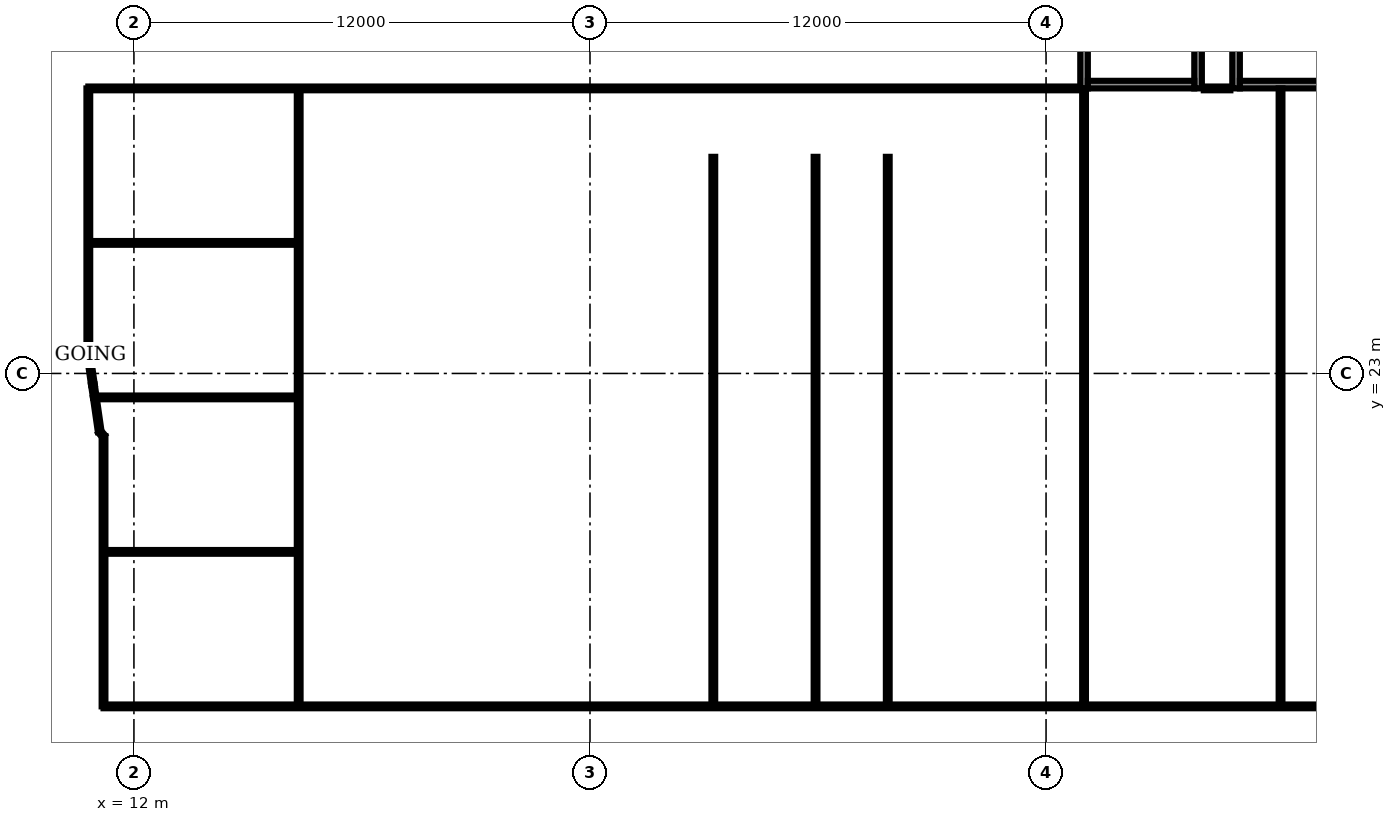
"""IFC4 building model, lengths in metres.
Left out: names, types, materials, properties, quantities, classifications, styles, units other than length and angle.
Written with IfcOpenShell. Run it as: python <this file> out.ifc"""

import sys

from ifc_helpers import new_model, si_unit, direction, frame, frame_2d, origin, origin_2d, place, context, subcontext, project, spatial, rectangle, i_section, extrude, element, fill, save


model = new_model("IFC4")
c1 = context("Model", 3, precision=1e-05, world=origin(), true_north=direction((0.0, 1.0)))
c2 = subcontext(c1, "Body", "Model", "MODEL_VIEW")
j1 = project(units=[si_unit("LENGTHUNIT", "METRE"), si_unit("PLANEANGLEUNIT", "RADIAN")], contexts=[c1])
p1 = place(None, origin())
s1 = spatial("IfcSite", under=j1, at=p1, CompositionType="ELEMENT")
p2 = place(p1, origin())
s2 = spatial("IfcBuilding", under=s1, at=p2, CompositionType="ELEMENT")
p3 = place(p2, frame((0.0, 0.0, 41.5)))
s3 = spatial("IfcBuildingStorey", under=s2, at=p3, CompositionType="ELEMENT", Elevation=41.5)
for number, where, z_axis, x_axis in (
    (1, (12.0, 23.0, 0.0), (0.0, 0.0, 1.0), (1.0, 0.0, 0.0)),
    (2, (24.0, 23.0, 0.0), (0.0, 0.0, 1.0), (1.0, 0.0, 0.0)),
    (3, (36.0, 23.0, 0.0), (0.0, 0.0, 1.0), (1.0, 0.0, 0.0)),
):
    element("IfcColumn", number, at=place(p3, frame(where, z_axis=z_axis, x_axis=x_axis)), inside=s3, PredefinedType="COLUMN", context=c2, shape_type="SweptSolid", body=[
        extrude(i_section(OverallWidth=0.305, OverallDepth=0.62, WebThickness=0.021, FlangeThickness=0.04, FilletRadius=0.027, at=origin_2d()), origin(), (0.0, 0.0, 1.0), 3.6),
    ])
p4 = place(p3, frame((37.0, 30.5, 0.0), z_axis=(0.0, 0.0, 1.0), x_axis=(0.0, 1.0, 0.0)))
e4 = element("IfcWall", 4, at=p4, inside=s3, PredefinedType="PARTITIONING", context=c2, shape_type="SweptSolid", body=[
    extrude(rectangle(XDim=3.5, YDim=0.2, at=frame_2d((1.75, 0.0))), origin(), (0.0, 0.0, 1.0), 3.2),
])
p5 = place(p4, frame((1.2, 0.0, 0.0)))
e5 = element("IfcOpeningElement", 5, at=p5, cuts=e4, PredefinedType="OPENING", context=c2, shape_type="SweptSolid", body=[
    extrude(rectangle(XDim=1.1, YDim=2.1, at=frame_2d((0.55, 1.05))), frame((0.0, 0.11, 0.0), z_axis=(0.0, -1.0, 0.0), x_axis=(1.0, 0.0, 0.0)), (0.0, 0.0, 1.0), 0.22),
])
p6 = place(p3, frame((40.0, 30.5, 0.0), z_axis=(0.0, 0.0, 1.0), x_axis=(0.0, 1.0, 0.0)))
e6 = element("IfcWall", 6, at=p6, inside=s3, PredefinedType="PARTITIONING", context=c2, shape_type="SweptSolid", body=[
    extrude(rectangle(XDim=3.5, YDim=0.2, at=frame_2d((1.75, 0.0))), origin(), (0.0, 0.0, 1.0), 3.2),
])
p7 = place(p3, frame((37.1, 30.6, 0.0), z_axis=(0.0, 0.0, 1.0), x_axis=(1.0, 0.0, 0.0)))
e7 = element("IfcWall", 7, at=p7, inside=s3, PredefinedType="PARTITIONING", context=c2, shape_type="SweptSolid", body=[
    extrude(rectangle(XDim=2.8, YDim=0.2, at=frame_2d((1.4, 0.0))), origin(), (0.0, 0.0, 1.0), 3.2),
])
p8 = place(p3, frame((41.0, 30.5, 0.0), z_axis=(0.0, 0.0, 1.0), x_axis=(0.0, 1.0, 0.0)))
e8 = element("IfcWall", 8, at=p8, inside=s3, PredefinedType="PARTITIONING", context=c2, shape_type="SweptSolid", body=[
    extrude(rectangle(XDim=3.5, YDim=0.2, at=frame_2d((1.75, 0.0))), origin(), (0.0, 0.0, 1.0), 3.2),
])
p9 = place(p3, frame((41.1, 30.6, 0.0), z_axis=(0.0, 0.0, 1.0), x_axis=(1.0, 0.0, 0.0)))
e9 = element("IfcWall", 9, at=p9, inside=s3, PredefinedType="PARTITIONING", context=c2, shape_type="SweptSolid", body=[
    extrude(rectangle(XDim=2.8, YDim=0.2, at=frame_2d((1.4, 0.0))), origin(), (0.0, 0.0, 1.0), 3.2),
])
p10 = place(p3, frame((10.8, 23.55, 0.0), z_axis=(0.0, 0.0, 1.0), x_axis=(0.0, 1.0, 0.0)))
e10 = element("IfcWall", 10, at=p10, inside=s3, PredefinedType="PARTITIONING", context=c2, shape_type="SweptSolid", body=[
    extrude(rectangle(XDim=6.95, YDim=0.1, at=frame_2d((3.475, 0.0))), origin(), (0.0, 0.0, 1.0), 3.2),
])
p11 = place(p10, frame((0.308, 0.0, 0.0)))
e11 = element("IfcOpeningElement", 11, at=p11, cuts=e10, PredefinedType="OPENING", context=c2, shape_type="SweptSolid", body=[
    extrude(rectangle(XDim=1.0, YDim=2.1, at=frame_2d((0.5, 1.05))), frame((0.0, 0.06, 0.0), z_axis=(0.0, -1.0, 0.0), x_axis=(1.0, 0.0, 0.0)), (0.0, 0.0, 1.0), 0.12),
])
p12 = place(p3, frame((10.8, 26.435, 0.0), z_axis=(0.0, 0.0, 1.0), x_axis=(1.0, 0.0, 0.0)))
e12 = element("IfcWall", 12, at=p12, inside=s3, PredefinedType="PARTITIONING", context=c2, shape_type="SweptSolid", body=[
    extrude(rectangle(XDim=5.535, YDim=0.1, at=frame_2d((2.768, 0.0))), origin(), (0.0, 0.0, 1.0), 3.2),
])
p13 = place(p3, frame((10.8, 30.5, 0.0), z_axis=(0.0, 0.0, 1.0), x_axis=(1.0, 0.0, 0.0)))
e13 = element("IfcWall", 13, at=p13, inside=s3, PredefinedType="PARTITIONING", context=c2, shape_type="SweptSolid", body=[
    extrude(rectangle(XDim=26.05, YDim=0.1, at=frame_2d((13.025, 0.0))), origin(), (0.0, 0.0, 1.0), 3.2),
])
p14 = place(p13, frame((0.235, 0.0, 0.0)))
e14 = element("IfcOpeningElement", 14, at=p14, cuts=e13, PredefinedType="OPENING", context=c2, shape_type="SweptSolid", body=[
    extrude(rectangle(XDim=1.0, YDim=2.1, at=frame_2d((0.5, 1.05))), frame((0.0, 0.06, 0.0), z_axis=(0.0, -1.0, 0.0), x_axis=(1.0, 0.0, 0.0)), (0.0, 0.0, 1.0), 0.12),
])
p15 = place(p13, frame((10.955, 0.0, 0.0)))
e15 = element("IfcOpeningElement", 15, at=p15, cuts=e13, PredefinedType="OPENING", context=c2, shape_type="SweptSolid", body=[
    extrude(rectangle(XDim=1.0, YDim=2.1, at=frame_2d((0.5, 1.05))), frame((0.0, 0.06, 0.0), z_axis=(0.0, -1.0, 0.0), x_axis=(1.0, 0.0, 0.0)), (0.0, 0.0, 1.0), 0.12),
])
p16 = place(p3, frame((10.92, 22.705, 0.0), z_axis=(0.0, 0.0, 1.0), x_axis=(-0.14046, 0.990086, 0.0)))
e16 = element("IfcWall", 16, at=p16, inside=s3, PredefinedType="PARTITIONING", context=c2, shape_type="SweptSolid", body=[
    extrude(rectangle(XDim=0.854, YDim=0.1, at=frame_2d((0.427, 0.0))), origin(), (0.0, 0.0, 1.0), 3.2),
])
p17 = place(p3, frame((10.97, 22.37, 0.0), z_axis=(0.0, 0.0, 1.0), x_axis=(-0.147776, 0.989018, 0.0)))
e17 = element("IfcWall", 17, at=p17, inside=s3, PredefinedType="PARTITIONING", context=c2, shape_type="SweptSolid", body=[
    extrude(rectangle(XDim=0.339, YDim=0.1, at=frame_2d((0.169, 0.0))), origin(), (0.0, 0.0, 1.0), 3.2),
])
p18 = place(p3, frame((10.97, 22.37, 0.0), z_axis=(0.0, 0.0, 1.0), x_axis=(1.0, 0.0, 0.0)))
e18 = element("IfcWall", 18, at=p18, inside=s3, PredefinedType="PARTITIONING", context=c2, shape_type="SweptSolid", body=[
    extrude(rectangle(XDim=5.365, YDim=0.1, at=frame_2d((2.683, 0.0))), origin(), (0.0, 0.0, 1.0), 3.2),
])
p19 = place(p3, frame((11.1, 21.465, 0.0), z_axis=(0.0, 0.0, 1.0), x_axis=(-0.142318, 0.989818, 0.0)))
e19 = element("IfcWall", 19, at=p19, inside=s3, PredefinedType="PARTITIONING", context=c2, shape_type="SweptSolid", body=[
    extrude(rectangle(XDim=0.914, YDim=0.1, at=frame_2d((0.457, 0.0))), origin(), (0.0, 0.0, 1.0), 3.2),
])
p20 = place(p3, frame((11.2, 14.24, 0.0), z_axis=(0.0, 0.0, 1.0), x_axis=(0.0, 1.0, 0.0)))
e20 = element("IfcWall", 20, at=p20, inside=s3, PredefinedType="PARTITIONING", context=c2, shape_type="SweptSolid", body=[
    extrude(rectangle(XDim=7.11, YDim=0.1, at=frame_2d((3.555, 0.0))), origin(), (0.0, 0.0, 1.0), 3.2),
])
p21 = place(p20, frame((5.085, 0.0, 0.0)))
e21 = element("IfcOpeningElement", 21, at=p21, cuts=e20, PredefinedType="OPENING", context=c2, shape_type="SweptSolid", body=[
    extrude(rectangle(XDim=1.0, YDim=2.1, at=frame_2d((0.5, 1.05))), frame((0.0, 0.06, 0.0), z_axis=(0.0, -1.0, 0.0), x_axis=(1.0, 0.0, 0.0)), (0.0, 0.0, 1.0), 0.12),
])
p22 = place(p3, frame((11.2, 14.24, 0.0), z_axis=(0.0, 0.0, 1.0), x_axis=(1.0, 0.0, 0.0)))
e22 = element("IfcWall", 22, at=p22, inside=s3, PredefinedType="PARTITIONING", context=c2, shape_type="SweptSolid", body=[
    extrude(rectangle(XDim=51.635, YDim=0.1, at=frame_2d((25.817, 0.0))), origin(), (0.0, 0.0, 1.0), 3.2),
])
p23 = place(p22, frame((0.115, 0.0, 0.0)))
e23 = element("IfcOpeningElement", 23, at=p23, cuts=e22, PredefinedType="OPENING", context=c2, shape_type="SweptSolid", body=[
    extrude(rectangle(XDim=1.0, YDim=2.1, at=frame_2d((0.5, 1.05))), frame((0.0, 0.06, 0.0), z_axis=(0.0, -1.0, 0.0), x_axis=(1.0, 0.0, 0.0)), (0.0, 0.0, 1.0), 0.12),
])
p24 = place(p22, frame((6.635, 0.0, 0.0)))
e24 = element("IfcOpeningElement", 24, at=p24, cuts=e22, PredefinedType="OPENING", context=c2, shape_type="SweptSolid", body=[
    extrude(rectangle(XDim=1.0, YDim=2.1, at=frame_2d((0.5, 1.05))), frame((0.0, 0.06, 0.0), z_axis=(0.0, -1.0, 0.0), x_axis=(1.0, 0.0, 0.0)), (0.0, 0.0, 1.0), 0.12),
])
p25 = place(p22, frame((22.7, 0.0, 0.0)))
e25 = element("IfcOpeningElement", 25, at=p25, cuts=e22, PredefinedType="OPENING", context=c2, shape_type="SweptSolid", body=[
    extrude(rectangle(XDim=1.0, YDim=2.1, at=frame_2d((0.5, 1.05))), frame((0.0, 0.06, 0.0), z_axis=(0.0, -1.0, 0.0), x_axis=(1.0, 0.0, 0.0)), (0.0, 0.0, 1.0), 0.12),
])
p26 = place(p22, frame((27.865, 0.0, 0.0)))
e26 = element("IfcOpeningElement", 26, at=p26, cuts=e22, PredefinedType="OPENING", context=c2, shape_type="SweptSolid", body=[
    extrude(rectangle(XDim=1.0, YDim=2.1, at=frame_2d((0.5, 1.05))), frame((0.0, 0.06, 0.0), z_axis=(0.0, -1.0, 0.0), x_axis=(1.0, 0.0, 0.0)), (0.0, 0.0, 1.0), 0.12),
])
p27 = place(p22, frame((34.065, 0.0, 0.0)))
e27 = element("IfcOpeningElement", 27, at=p27, cuts=e22, PredefinedType="OPENING", context=c2, shape_type="SweptSolid", body=[
    extrude(rectangle(XDim=1.8, YDim=2.1, at=frame_2d((0.9, 1.05))), frame((0.0, 0.06, 0.0), z_axis=(0.0, -1.0, 0.0), x_axis=(1.0, 0.0, 0.0)), (0.0, 0.0, 1.0), 0.12),
])
p28 = place(p22, frame((41.765, 0.0, 0.0)))
e28 = element("IfcOpeningElement", 28, at=p28, cuts=e22, PredefinedType="OPENING", context=c2, shape_type="SweptSolid", body=[
    extrude(rectangle(XDim=1.8, YDim=2.1, at=frame_2d((0.9, 1.05))), frame((0.0, 0.06, 0.0), z_axis=(0.0, -1.0, 0.0), x_axis=(1.0, 0.0, 0.0)), (0.0, 0.0, 1.0), 0.12),
])
p29 = place(p3, frame((11.2, 18.305, 0.0), z_axis=(0.0, 0.0, 1.0), x_axis=(1.0, 0.0, 0.0)))
e29 = element("IfcWall", 29, at=p29, inside=s3, PredefinedType="PARTITIONING", context=c2, shape_type="SweptSolid", body=[
    extrude(rectangle(XDim=5.135, YDim=0.1, at=frame_2d((2.567, 0.0))), origin(), (0.0, 0.0, 1.0), 3.2),
])
p30 = place(p3, frame((11.2, 21.35, 0.0), z_axis=(0.0, 0.0, 1.0), x_axis=(-0.65566, 0.755051, 0.0)))
e30 = element("IfcWall", 30, at=p30, inside=s3, PredefinedType="PARTITIONING", context=c2, shape_type="SweptSolid", body=[
    extrude(rectangle(XDim=0.152, YDim=0.1, at=frame_2d((0.076, 0.0))), origin(), (0.0, 0.0, 1.0), 3.2),
])
for number, where, z_axis, x_axis in (
    (31, (16.335, 14.24, 0.0), (0.0, 0.0, 1.0), (0.0, 1.0, 0.0)),
    (32, (20.335, 14.24, 0.0), (0.0, 0.0, 1.0), (0.0, 1.0, 0.0)),
):
    element("IfcWall", number, at=place(p3, frame(where, z_axis=z_axis, x_axis=x_axis)), inside=s3, PredefinedType="PARTITIONING", context=c2, shape_type="SweptSolid", body=[
        extrude(rectangle(XDim=16.26, YDim=0.1, at=frame_2d((8.13, 0.0))), origin(), (0.0, 0.0, 1.0), 3.2),
    ])
p31 = place(p3, frame((24.335, 14.24, 0.0), z_axis=(0.0, 0.0, 1.0), x_axis=(0.0, 1.0, 0.0)))
e33 = element("IfcWall", 33, at=p31, inside=s3, PredefinedType="PARTITIONING", context=c2, shape_type="SweptSolid", body=[
    extrude(rectangle(XDim=16.25, YDim=0.1, at=frame_2d((8.125, 0.0))), origin(), (0.0, 0.0, 1.0), 3.2),
])
p32 = place(p3, frame((24.335, 28.7, 0.0), z_axis=(0.0, 0.0, 1.0), x_axis=(1.0, 0.0, 0.0)))
e34 = element("IfcWall", 34, at=p32, inside=s3, PredefinedType="PARTITIONING", context=c2, shape_type="SweptSolid", body=[
    extrude(rectangle(XDim=7.5, YDim=0.1, at=frame_2d((3.75, 0.0))), origin(), (0.0, 0.0, 1.0), 3.2),
])
p33 = place(p32, frame((0.95, 0.0, 0.0)))
e35 = element("IfcOpeningElement", 35, at=p33, cuts=e34, PredefinedType="OPENING", context=c2, shape_type="SweptSolid", body=[
    extrude(rectangle(XDim=0.9, YDim=2.1, at=frame_2d((0.45, 1.05))), frame((0.0, 0.06, 0.0), z_axis=(0.0, -1.0, 0.0), x_axis=(1.0, 0.0, 0.0)), (0.0, 0.0, 1.0), 0.12),
])
p34 = place(p32, frame((3.78, 0.0, 0.0)))
e36 = element("IfcOpeningElement", 36, at=p34, cuts=e34, PredefinedType="OPENING", context=c2, shape_type="SweptSolid", body=[
    extrude(rectangle(XDim=0.9, YDim=2.1, at=frame_2d((0.45, 1.05))), frame((0.0, 0.06, 0.0), z_axis=(0.0, -1.0, 0.0), x_axis=(1.0, 0.0, 0.0)), (0.0, 0.0, 1.0), 0.12),
])
p35 = place(p32, frame((6.02, 0.0, 0.0)))
e37 = element("IfcOpeningElement", 37, at=p35, cuts=e34, PredefinedType="OPENING", context=c2, shape_type="SweptSolid", body=[
    extrude(rectangle(XDim=1.0, YDim=2.1, at=frame_2d((0.5, 1.05))), frame((0.0, 0.06, 0.0), z_axis=(0.0, -1.0, 0.0), x_axis=(1.0, 0.0, 0.0)), (0.0, 0.0, 1.0), 0.12),
])
for number, where, z_axis, x_axis in (
    (38, (27.245, 14.24, 0.0), (0.0, 0.0, 1.0), (0.0, 1.0, 0.0)),
    (39, (29.935, 14.24, 0.0), (0.0, 0.0, 1.0), (0.0, 1.0, 0.0)),
    (40, (31.835, 14.24, 0.0), (0.0, 0.0, 1.0), (0.0, 1.0, 0.0)),
):
    element("IfcWall", number, at=place(p3, frame(where, z_axis=z_axis, x_axis=x_axis)), inside=s3, PredefinedType="PARTITIONING", context=c2, shape_type="SweptSolid", body=[
        extrude(rectangle(XDim=14.46, YDim=0.1, at=frame_2d((7.23, 0.0))), origin(), (0.0, 0.0, 1.0), 3.2),
    ])
for number, where, z_axis, x_axis in (
    (41, (37.0, 14.24, 0.0), (0.0, 0.0, 1.0), (0.0, 1.0, 0.0)),
    (42, (42.17, 14.24, 0.0), (0.0, 0.0, 1.0), (0.0, 1.0, 0.0)),
):
    element("IfcWall", number, at=place(p3, frame(where, z_axis=z_axis, x_axis=x_axis)), inside=s3, PredefinedType="PARTITIONING", context=c2, shape_type="SweptSolid", body=[
        extrude(rectangle(XDim=16.26, YDim=0.1, at=frame_2d((8.13, 0.0))), origin(), (0.0, 0.0, 1.0), 3.2),
    ])
p36 = place(p3, frame((40.15, 30.5, 0.0), z_axis=(0.0, 0.0, 1.0), x_axis=(1.0, 0.0, 0.0)))
e43 = element("IfcWall", 43, at=p36, inside=s3, PredefinedType="PARTITIONING", context=c2, shape_type="SweptSolid", body=[
    extrude(rectangle(XDim=0.7, YDim=0.1, at=frame_2d((0.35, 0.0))), origin(), (0.0, 0.0, 1.0), 3.2),
])
p37 = place(p23, origin())
e44 = element("IfcDoor", 44, at=p37, inside=s3, OperationType="SINGLE_SWING_LEFT", PredefinedType="DOOR", context=c2, shape_type="SweptSolid", body=[
    extrude(rectangle(XDim=1.0, YDim=2.1, at=frame_2d((0.5, 1.05))), frame((0.0, 0.025, 0.0), z_axis=(0.0, -1.0, 0.0), x_axis=(1.0, 0.0, 0.0)), (0.0, 0.0, 1.0), 0.05),
])
fill(e23, e44)
p38 = place(p24, origin())
e45 = element("IfcDoor", 45, at=p38, inside=s3, OperationType="SINGLE_SWING_LEFT", PredefinedType="DOOR", context=c2, shape_type="SweptSolid", body=[
    extrude(rectangle(XDim=1.0, YDim=2.1, at=frame_2d((0.5, 1.05))), frame((0.0, 0.025, 0.0), z_axis=(0.0, -1.0, 0.0), x_axis=(1.0, 0.0, 0.0)), (0.0, 0.0, 1.0), 0.05),
])
fill(e24, e45)
p39 = place(p25, origin())
e46 = element("IfcDoor", 46, at=p39, inside=s3, OperationType="SINGLE_SWING_LEFT", PredefinedType="DOOR", context=c2, shape_type="SweptSolid", body=[
    extrude(rectangle(XDim=1.0, YDim=2.1, at=frame_2d((0.5, 1.05))), frame((0.0, 0.025, 0.0), z_axis=(0.0, -1.0, 0.0), x_axis=(1.0, 0.0, 0.0)), (0.0, 0.0, 1.0), 0.05),
])
fill(e25, e46)
p40 = place(p26, origin())
e47 = element("IfcDoor", 47, at=p40, inside=s3, OperationType="SINGLE_SWING_RIGHT", PredefinedType="DOOR", context=c2, shape_type="SweptSolid", body=[
    extrude(rectangle(XDim=1.0, YDim=2.1, at=frame_2d((0.5, 1.05))), frame((0.0, 0.025, 0.0), z_axis=(0.0, -1.0, 0.0), x_axis=(1.0, 0.0, 0.0)), (0.0, 0.0, 1.0), 0.05),
])
fill(e26, e47)
p41 = place(p21, origin())
e48 = element("IfcDoor", 48, at=p41, inside=s3, OperationType="SINGLE_SWING_RIGHT", PredefinedType="DOOR", context=c2, shape_type="SweptSolid", body=[
    extrude(rectangle(XDim=1.0, YDim=2.1, at=frame_2d((0.5, 1.05))), frame((0.0, 0.025, 0.0), z_axis=(0.0, -1.0, 0.0), x_axis=(1.0, 0.0, 0.0)), (0.0, 0.0, 1.0), 0.05),
])
fill(e21, e48)
p42 = place(p11, origin())
e49 = element("IfcDoor", 49, at=p42, inside=s3, OperationType="SINGLE_SWING_LEFT", PredefinedType="DOOR", context=c2, shape_type="SweptSolid", body=[
    extrude(rectangle(XDim=1.0, YDim=2.1, at=frame_2d((0.5, 1.05))), frame((0.0, 0.025, 0.0), z_axis=(0.0, -1.0, 0.0), x_axis=(1.0, 0.0, 0.0)), (0.0, 0.0, 1.0), 0.05),
])
fill(e11, e49)
p43 = place(p33, origin())
e50 = element("IfcDoor", 50, at=p43, inside=s3, OperationType="SINGLE_SWING_LEFT", PredefinedType="DOOR", context=c2, shape_type="SweptSolid", body=[
    extrude(rectangle(XDim=0.9, YDim=2.1, at=frame_2d((0.45, 1.05))), frame((0.0, 0.025, 0.0), z_axis=(0.0, -1.0, 0.0), x_axis=(1.0, 0.0, 0.0)), (0.0, 0.0, 1.0), 0.05),
])
fill(e35, e50)
p44 = place(p34, origin())
e51 = element("IfcDoor", 51, at=p44, inside=s3, OperationType="SINGLE_SWING_RIGHT", PredefinedType="DOOR", context=c2, shape_type="SweptSolid", body=[
    extrude(rectangle(XDim=0.9, YDim=2.1, at=frame_2d((0.45, 1.05))), frame((0.0, 0.025, 0.0), z_axis=(0.0, -1.0, 0.0), x_axis=(1.0, 0.0, 0.0)), (0.0, 0.0, 1.0), 0.05),
])
fill(e36, e51)
p45 = place(p35, origin())
e52 = element("IfcDoor", 52, at=p45, inside=s3, OperationType="SINGLE_SWING_RIGHT", PredefinedType="DOOR", context=c2, shape_type="SweptSolid", body=[
    extrude(rectangle(XDim=1.0, YDim=2.1, at=frame_2d((0.5, 1.05))), frame((0.0, 0.025, 0.0), z_axis=(0.0, -1.0, 0.0), x_axis=(1.0, 0.0, 0.0)), (0.0, 0.0, 1.0), 0.05),
])
fill(e37, e52)
p46 = place(p14, origin())
e53 = element("IfcDoor", 53, at=p46, inside=s3, OperationType="SINGLE_SWING_LEFT", PredefinedType="DOOR", context=c2, shape_type="SweptSolid", body=[
    extrude(rectangle(XDim=1.0, YDim=2.1, at=frame_2d((0.5, 1.05))), frame((0.0, 0.025, 0.0), z_axis=(0.0, -1.0, 0.0), x_axis=(1.0, 0.0, 0.0)), (0.0, 0.0, 1.0), 0.05),
])
fill(e14, e53)
p47 = place(p15, origin())
e54 = element("IfcDoor", 54, at=p47, inside=s3, OperationType="SINGLE_SWING_LEFT", PredefinedType="DOOR", context=c2, shape_type="SweptSolid", body=[
    extrude(rectangle(XDim=1.0, YDim=2.1, at=frame_2d((0.5, 1.05))), frame((0.0, 0.025, 0.0), z_axis=(0.0, -1.0, 0.0), x_axis=(1.0, 0.0, 0.0)), (0.0, 0.0, 1.0), 0.05),
])
fill(e15, e54)
save(model, sys.argv[1])
